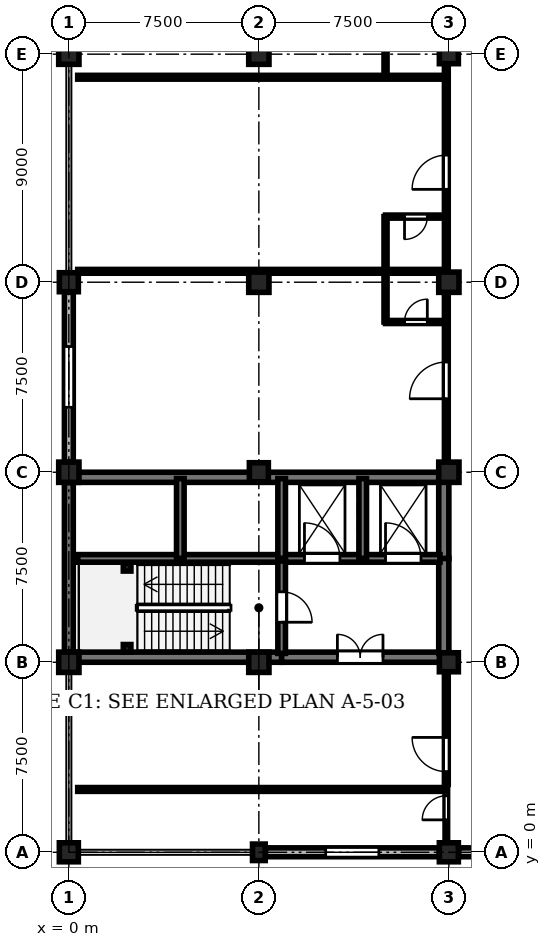
"""IFC4 building model, lengths in metres.
Left out: names, types, materials, properties, quantities, classifications, styles, units other than length and angle.
Written with IfcOpenShell. Run it as: python <this file> out.ifc"""

import sys

from ifc_helpers import new_model, si_unit, direction, frame, frame_2d, origin, origin_with_axes, origin_2d, place, context, subcontext, project, spatial, rectangle, circle, i_section, extrude, element, fill, save


model = new_model("IFC4")
c1 = context("Model", 3, precision=1e-05, world=origin(), true_north=direction((0.0, 1.0)))
c2 = subcontext(c1, "Body", "Model", "MODEL_VIEW")
j1 = project(units=[si_unit("LENGTHUNIT", "METRE"), si_unit("PLANEANGLEUNIT", "RADIAN")], contexts=[c1])
p1 = place(None, origin())
s1 = spatial("IfcSite", under=j1, at=p1, CompositionType="ELEMENT")
p2 = place(p1, origin())
s2 = spatial("IfcBuilding", under=s1, at=p2, CompositionType="ELEMENT")
p3 = place(p2, frame((0.0, 0.0, 9.3)))
s3 = spatial("IfcBuildingStorey", under=s2, at=p3, CompositionType="ELEMENT", Elevation=9.3)
p4 = place(p3, origin_with_axes())
e1 = element("IfcColumn", 1, at=p4, inside=s3, PredefinedType="COLUMN", context=c2, shape_type="SweptSolid", body=[
    extrude(rectangle(XDim=0.75, YDim=0.75, at=origin_2d()), origin(), (0.0, 0.0, 1.0), 4.8),
])
for number, where, z_axis, x_axis in (
    (2, (0.0, 7.5, 0.0), (0.0, 0.0, 1.0), (1.0, 0.0, 0.0)),
    (3, (0.0, 15.0, 0.0), (0.0, 0.0, 1.0), (1.0, 0.0, 0.0)),
):
    element("IfcColumn", number, at=place(p3, frame(where, z_axis=z_axis, x_axis=x_axis)), inside=s3, PredefinedType="COLUMN", context=c2, shape_type="SweptSolid", body=[
        extrude(rectangle(XDim=0.8, YDim=0.8, at=origin_2d()), origin(), (0.0, 0.0, 1.0), 4.8),
    ])
p5 = place(p3, frame((0.0, 22.5, 0.0), z_axis=(0.0, 0.0, 1.0), x_axis=(1.0, 0.0, 0.0)))
e4 = element("IfcColumn", 4, at=p5, inside=s3, PredefinedType="COLUMN", context=c2, shape_type="SweptSolid", body=[
    extrude(circle(Radius=0.375, at=origin_2d()), origin(), (0.0, 0.0, 1.0), 4.8),
])
p6 = place(p3, frame((0.0, 31.5, 0.0), z_axis=(0.0, 0.0, 1.0), x_axis=(1.0, 0.0, 0.0)))
e5 = element("IfcColumn", 5, at=p6, inside=s3, PredefinedType="COLUMN", context=c2, shape_type="SweptSolid", body=[
    extrude(rectangle(XDim=0.8, YDim=0.8, at=origin_2d()), origin(), (0.0, 0.0, 1.0), 4.8),
])
p7 = place(p3, frame((7.5, 0.0, 0.0), z_axis=(0.0, 0.0, 1.0), x_axis=(1.0, 0.0, 0.0)))
e6 = element("IfcColumn", 6, at=p7, inside=s3, PredefinedType="COLUMN", context=c2, shape_type="SweptSolid", body=[
    extrude(rectangle(XDim=0.5, YDim=0.65, at=origin_2d()), origin(), (0.0, 0.0, 1.0), 4.8),
])
p8 = place(p3, frame((7.5, 7.5, 0.0), z_axis=(0.0, 0.0, 1.0), x_axis=(1.0, 0.0, 0.0)))
e7 = element("IfcColumn", 7, at=p8, inside=s3, PredefinedType="COLUMN", context=c2, shape_type="SweptSolid", body=[
    extrude(rectangle(XDim=0.8, YDim=0.8, at=origin_2d()), origin(), (0.0, 0.0, 1.0), 4.8),
])
p9 = place(p3, frame((7.5, 15.0, 0.0), z_axis=(0.0, 0.0, 1.0), x_axis=(1.0, 0.0, 0.0)))
e8 = element("IfcColumn", 8, at=p9, inside=s3, PredefinedType="COLUMN", context=c2, shape_type="SweptSolid", body=[
    extrude(circle(Radius=0.375, at=origin_2d()), origin(), (0.0, 0.0, 1.0), 4.8),
])
for number, where, z_axis, x_axis in (
    (9, (7.5, 22.5, 0.0), (0.0, 0.0, 1.0), (1.0, 0.0, 0.0)),
    (10, (7.5, 31.5, 0.0), (0.0, 0.0, 1.0), (1.0, 0.0, 0.0)),
):
    element("IfcColumn", number, at=place(p3, frame(where, z_axis=z_axis, x_axis=x_axis)), inside=s3, PredefinedType="COLUMN", context=c2, shape_type="SweptSolid", body=[
        extrude(rectangle(XDim=0.8, YDim=0.8, at=origin_2d()), origin(), (0.0, 0.0, 1.0), 4.8),
    ])
p10 = place(p3, frame((15.0, 0.0, 0.0), z_axis=(0.0, 0.0, 1.0), x_axis=(1.0, 0.0, 0.0)))
e11 = element("IfcColumn", 11, at=p10, inside=s3, PredefinedType="COLUMN", context=c2, shape_type="SweptSolid", body=[
    extrude(rectangle(XDim=0.75, YDim=0.75, at=origin_2d()), origin(), (0.0, 0.0, 1.0), 4.8),
])
p11 = place(p3, frame((15.0, 7.5, 0.0), z_axis=(0.0, 0.0, 1.0), x_axis=(1.0, 0.0, 0.0)))
e12 = element("IfcColumn", 12, at=p11, inside=s3, PredefinedType="COLUMN", context=c2, shape_type="SweptSolid", body=[
    extrude(circle(Radius=0.375, at=origin_2d()), origin(), (0.0, 0.0, 1.0), 4.8),
])
for number, where, z_axis, x_axis in (
    (13, (15.0, 15.0, 0.0), (0.0, 0.0, 1.0), (1.0, 0.0, 0.0)),
    (14, (15.0, 22.5, 0.0), (0.0, 0.0, 1.0), (1.0, 0.0, 0.0)),
):
    element("IfcColumn", number, at=place(p3, frame(where, z_axis=z_axis, x_axis=x_axis)), inside=s3, PredefinedType="COLUMN", context=c2, shape_type="SweptSolid", body=[
        extrude(rectangle(XDim=0.8, YDim=0.8, at=origin_2d()), origin(), (0.0, 0.0, 1.0), 4.8),
    ])
p12 = place(p3, frame((15.0, 31.5, 0.0), z_axis=(0.0, 0.0, 1.0), x_axis=(1.0, 0.0, 0.0)))
e15 = element("IfcColumn", 15, at=p12, inside=s3, PredefinedType="COLUMN", context=c2, shape_type="SweptSolid", body=[
    extrude(circle(Radius=0.375, at=origin_2d()), origin(), (0.0, 0.0, 1.0), 4.8),
])
for number, where, z_axis, x_axis in (
    (16, (2.3, 8.05, 0.0), (0.0, 0.0, 1.0), (1.0, 0.0, 0.0)),
    (17, (2.3, 11.25, 0.0), (0.0, 0.0, 1.0), (1.0, 0.0, 0.0)),
):
    element("IfcColumn", number, at=place(p3, frame(where, z_axis=z_axis, x_axis=x_axis)), inside=s3, PredefinedType="COLUMN", context=c2, shape_type="SweptSolid", body=[
        extrude(i_section(OverallWidth=0.3, OverallDepth=0.3, WebThickness=0.011, FlangeThickness=0.019, FilletRadius=0.027, at=origin_2d()), origin(), (0.0, 0.0, 1.0), 4.8),
    ])
p13 = place(p3, frame((0.0, 7.91, 0.0), z_axis=(0.0, 0.0, 1.0), x_axis=(0.0, 1.0, 0.0)))
e18 = element("IfcWall", 18, at=p13, inside=s3, PredefinedType="SHEAR", context=c2, shape_type="SweptSolid", body=[
    extrude(rectangle(XDim=6.68, YDim=0.35, at=frame_2d((3.34, 0.0))), origin(), (0.0, 0.0, 1.0), 4.55),
])
p14 = place(p3, frame((0.0, 15.41, 0.0), z_axis=(0.0, 0.0, 1.0), x_axis=(0.0, 1.0, 0.0)))
e19 = element("IfcWall", 19, at=p14, inside=s3, PredefinedType="STANDARD", context=c2, shape_type="SweptSolid", body=[
    extrude(rectangle(XDim=6.705, YDim=0.35, at=frame_2d((3.353, 0.0))), origin(), (0.0, 0.0, 1.0), 3.95),
])
p15 = place(p14, frame((2.153, 0.0, 0.9)))
e20 = element("IfcOpeningElement", 20, at=p15, cuts=e19, PredefinedType="OPENING", context=c2, shape_type="SweptSolid", body=[
    extrude(rectangle(XDim=2.4, YDim=2.1, at=frame_2d((1.2, 1.05))), frame((0.0, 0.185, 0.0), z_axis=(0.0, -1.0, 0.0), x_axis=(1.0, 0.0, 0.0)), (0.0, 0.0, 1.0), 0.37),
])
p16 = place(p3, frame((14.615, 0.0, 0.0), z_axis=(0.0, 0.0, 1.0), x_axis=(-1.0, 0.0, 0.0)))
e21 = element("IfcWall", 21, at=p16, inside=s3, PredefinedType="STANDARD", context=c2, shape_type="SweptSolid", body=[
    extrude(rectangle(XDim=6.855, YDim=0.35, at=frame_2d((3.427, 0.0))), origin(), (0.0, 0.0, 1.0), 3.95),
])
p17 = place(p16, frame((2.377, 0.0, 0.9)))
e22 = element("IfcOpeningElement", 22, at=p17, cuts=e21, PredefinedType="OPENING", context=c2, shape_type="SweptSolid", body=[
    extrude(rectangle(XDim=2.1, YDim=2.1, at=frame_2d((1.05, 1.05))), frame((0.0, 0.185, 0.0), z_axis=(0.0, -1.0, 0.0), x_axis=(1.0, 0.0, 0.0)), (0.0, 0.0, 1.0), 0.37),
])
p18 = place(p3, frame((22.24, 0.0, 0.0), z_axis=(0.0, 0.0, 1.0), x_axis=(-1.0, 0.0, 0.0)))
e23 = element("IfcWall", 23, at=p18, inside=s3, PredefinedType="STANDARD", context=c2, shape_type="SweptSolid", body=[
    extrude(rectangle(XDim=6.855, YDim=0.35, at=frame_2d((3.427, 0.0))), origin(), (0.0, 0.0, 1.0), 3.95),
])
p19 = place(p18, frame((2.228, 0.0, 0.9)))
e24 = element("IfcOpeningElement", 24, at=p19, cuts=e23, PredefinedType="OPENING", context=c2, shape_type="SweptSolid", body=[
    extrude(rectangle(XDim=2.4, YDim=2.1, at=frame_2d((1.2, 1.05))), frame((0.0, 0.185, 0.0), z_axis=(0.0, -1.0, 0.0), x_axis=(1.0, 0.0, 0.0)), (0.0, 0.0, 1.0), 0.37),
])
p20 = place(p3, frame((0.35, 7.7, 0.0), z_axis=(0.0, 0.0, 1.0), x_axis=(1.0, 0.0, 0.0)))
e25 = element("IfcWall", 25, at=p20, inside=s3, PredefinedType="SHEAR", context=c2, shape_type="SweptSolid", body=[
    extrude(rectangle(XDim=8.05, YDim=0.4, at=frame_2d((4.025, 0.0))), origin(), (0.0, 0.0, 1.0), 4.55),
])
p21 = place(p3, frame((8.4, 7.7, 0.0), z_axis=(0.0, 0.0, 1.0), x_axis=(1.0, 0.0, 0.0)))
e26 = element("IfcWall", 26, at=p21, inside=s3, PredefinedType="SHEAR", context=c2, shape_type="SweptSolid", body=[
    extrude(rectangle(XDim=6.25, YDim=0.4, at=frame_2d((3.125, 0.0))), origin(), (0.0, 0.0, 1.0), 4.55),
])
p22 = place(p21, frame((2.2, 0.0, 0.0)))
e27 = element("IfcOpeningElement", 27, at=p22, cuts=e26, PredefinedType="OPENING", context=c2, shape_type="SweptSolid", body=[
    extrude(rectangle(XDim=1.8, YDim=2.25, at=frame_2d((0.9, 1.125))), frame((0.0, 0.21, 0.0), z_axis=(0.0, -1.0, 0.0), x_axis=(1.0, 0.0, 0.0)), (0.0, 0.0, 1.0), 0.42),
])
p23 = place(p3, frame((0.35, 14.8, 0.0), z_axis=(0.0, 0.0, 1.0), x_axis=(1.0, 0.0, 0.0)))
e28 = element("IfcWall", 28, at=p23, inside=s3, PredefinedType="SHEAR", context=c2, shape_type="SweptSolid", body=[
    extrude(rectangle(XDim=14.3, YDim=0.4, at=frame_2d((7.15, 0.0))), origin(), (0.0, 0.0, 1.0), 4.55),
])
p24 = place(p3, frame((14.8, 7.85, 0.0), z_axis=(0.0, 0.0, 1.0), x_axis=(0.0, 1.0, 0.0)))
e29 = element("IfcWall", 29, at=p24, inside=s3, PredefinedType="SHEAR", context=c2, shape_type="SweptSolid", body=[
    extrude(rectangle(XDim=3.75, YDim=0.4, at=frame_2d((1.875, 0.0))), origin(), (0.0, 0.0, 1.0), 4.55),
])
p25 = place(p3, frame((14.8, 11.6, 0.0), z_axis=(0.0, 0.0, 1.0), x_axis=(0.0, 1.0, 0.0)))
e30 = element("IfcWall", 30, at=p25, inside=s3, PredefinedType="SHEAR", context=c2, shape_type="SweptSolid", body=[
    extrude(rectangle(XDim=3.05, YDim=0.4, at=frame_2d((1.525, 0.0))), origin(), (0.0, 0.0, 1.0), 4.55),
])
p26 = place(p3, frame((0.35, 11.6, 0.0), z_axis=(0.0, 0.0, 1.0), x_axis=(1.0, 0.0, 0.0)))
e31 = element("IfcWall", 31, at=p26, inside=s3, PredefinedType="SHEAR", context=c2, shape_type="SweptSolid", body=[
    extrude(rectangle(XDim=8.05, YDim=0.3, at=frame_2d((4.025, 0.0))), origin(), (0.0, 0.0, 1.0), 4.55),
])
p27 = place(p3, frame((8.4, 11.6, 0.0), z_axis=(0.0, 0.0, 1.0), x_axis=(1.0, 0.0, 0.0)))
e32 = element("IfcWall", 32, at=p27, inside=s3, PredefinedType="SHEAR", context=c2, shape_type="SweptSolid", body=[
    extrude(rectangle(XDim=6.25, YDim=0.3, at=frame_2d((3.125, 0.0))), origin(), (0.0, 0.0, 1.0), 4.55),
])
p28 = place(p27, frame((0.9, 0.0, 0.0)))
e33 = element("IfcOpeningElement", 33, at=p28, cuts=e32, PredefinedType="OPENING", context=c2, shape_type="SweptSolid", body=[
    extrude(rectangle(XDim=1.4, YDim=2.25, at=frame_2d((0.7, 1.125))), frame((0.0, 0.16, 0.0), z_axis=(0.0, -1.0, 0.0), x_axis=(1.0, 0.0, 0.0)), (0.0, 0.0, 1.0), 0.32),
])
p29 = place(p27, frame((4.1, 0.0, 0.0)))
e34 = element("IfcOpeningElement", 34, at=p29, cuts=e32, PredefinedType="OPENING", context=c2, shape_type="SweptSolid", body=[
    extrude(rectangle(XDim=1.4, YDim=2.25, at=frame_2d((0.7, 1.125))), frame((0.0, 0.16, 0.0), z_axis=(0.0, -1.0, 0.0), x_axis=(1.0, 0.0, 0.0)), (0.0, 0.0, 1.0), 0.32),
])
p30 = place(p3, frame((8.4, 11.5, 0.0), z_axis=(0.0, 0.0, 1.0), x_axis=(0.0, -1.0, 0.0)))
e35 = element("IfcWall", 35, at=p30, inside=s3, PredefinedType="SHEAR", context=c2, shape_type="SweptSolid", body=[
    extrude(rectangle(XDim=3.65, YDim=0.3, at=frame_2d((1.825, 0.0))), origin(), (0.0, 0.0, 1.0), 4.55),
])
p31 = place(p30, frame((1.22, 0.0, 0.0)))
e36 = element("IfcOpeningElement", 36, at=p31, cuts=e35, PredefinedType="OPENING", context=c2, shape_type="SweptSolid", body=[
    extrude(rectangle(XDim=1.2, YDim=2.25, at=frame_2d((0.6, 1.125))), frame((0.0, 0.16, 0.0), z_axis=(0.0, -1.0, 0.0), x_axis=(1.0, 0.0, 0.0)), (0.0, 0.0, 1.0), 0.32),
])
for number, where, z_axis, x_axis in (
    (37, (4.4, 11.6, 0.0), (0.0, 0.0, 1.0), (0.0, 1.0, 0.0)),
    (38, (8.4, 11.6, 0.0), (0.0, 0.0, 1.0), (0.0, 1.0, 0.0)),
    (39, (11.6, 11.6, 0.0), (0.0, 0.0, 1.0), (0.0, 1.0, 0.0)),
):
    element("IfcWall", number, at=place(p3, frame(where, z_axis=z_axis, x_axis=x_axis)), inside=s3, PredefinedType="SHEAR", context=c2, shape_type="SweptSolid", body=[
        extrude(rectangle(XDim=3.15, YDim=0.3, at=frame_2d((1.575, 0.0))), origin(), (0.0, 0.0, 1.0), 4.55),
    ])
p32 = place(p3, frame((14.9, 0.43, 0.0), z_axis=(0.0, 0.0, 1.0), x_axis=(0.0, 1.0, 0.0)))
e40 = element("IfcWall", 40, at=p32, inside=s3, PredefinedType="PARTITIONING", context=c2, shape_type="SweptSolid", body=[
    extrude(rectangle(XDim=2.05, YDim=0.1, at=frame_2d((1.025, 0.0))), origin(), (0.0, 0.0, 1.0), 3.985),
])
p33 = place(p32, frame((0.85, 0.0, 0.0)))
e41 = element("IfcOpeningElement", 41, at=p33, cuts=e40, PredefinedType="OPENING", context=c2, shape_type="SweptSolid", body=[
    extrude(rectangle(XDim=0.95, YDim=2.15, at=frame_2d((0.475, 1.075))), frame((0.0, 0.06, 0.0), z_axis=(0.0, -1.0, 0.0), x_axis=(1.0, 0.0, 0.0)), (0.0, 0.0, 1.0), 0.12),
])
p34 = place(p3, frame((14.9, 2.68, 0.0), z_axis=(0.0, 0.0, 1.0), x_axis=(0.0, 1.0, 0.0)))
e42 = element("IfcWall", 42, at=p34, inside=s3, PredefinedType="PARTITIONING", context=c2, shape_type="SweptSolid", body=[
    extrude(rectangle(XDim=4.39, YDim=0.15, at=frame_2d((2.195, 0.0))), origin(), (0.0, 0.0, 1.0), 3.985),
])
p35 = place(p34, frame((0.504, 0.0, 0.0)))
e43 = element("IfcOpeningElement", 43, at=p35, cuts=e42, PredefinedType="OPENING", context=c2, shape_type="SweptSolid", body=[
    extrude(rectangle(XDim=1.35, YDim=2.25, at=frame_2d((0.675, 1.125))), frame((0.0, 0.085, 0.0), z_axis=(0.0, -1.0, 0.0), x_axis=(1.0, 0.0, 0.0)), (0.0, 0.0, 1.0), 0.17),
])
p36 = place(p3, frame((14.9, 15.43, 0.0), z_axis=(0.0, 0.0, 1.0), x_axis=(0.0, 1.0, 0.0)))
e44 = element("IfcWall", 44, at=p36, inside=s3, PredefinedType="PARTITIONING", context=c2, shape_type="SweptSolid", body=[
    extrude(rectangle(XDim=7.5, YDim=0.15, at=frame_2d((3.75, 0.0))), origin(), (0.0, 0.0, 1.0), 3.835),
])
p37 = place(p36, frame((2.47, 0.0, 0.0)))
e45 = element("IfcOpeningElement", 45, at=p37, cuts=e44, PredefinedType="OPENING", context=c2, shape_type="SweptSolid", body=[
    extrude(rectangle(XDim=1.45, YDim=2.3, at=frame_2d((0.725, 1.15))), frame((0.0, 0.085, 0.0), z_axis=(0.0, -1.0, 0.0), x_axis=(1.0, 0.0, 0.0)), (0.0, 0.0, 1.0), 0.17),
])
p38 = place(p3, frame((12.5, 20.93, 0.0), z_axis=(0.0, 0.0, 1.0), x_axis=(1.0, 0.0, 0.0)))
e46 = element("IfcWall", 46, at=p38, inside=s3, PredefinedType="PARTITIONING", context=c2, shape_type="SweptSolid", body=[
    extrude(rectangle(XDim=2.4, YDim=0.12, at=frame_2d((1.2, 0.0))), origin(), (0.0, 0.0, 1.0), 4.535),
])
p39 = place(p38, frame((0.75, 0.0, 0.0)))
e47 = element("IfcOpeningElement", 47, at=p39, cuts=e46, PredefinedType="OPENING", context=c2, shape_type="SweptSolid", body=[
    extrude(rectangle(XDim=0.9, YDim=2.1, at=frame_2d((0.45, 1.05))), frame((0.0, 0.07, 0.0), z_axis=(0.0, -1.0, 0.0), x_axis=(1.0, 0.0, 0.0)), (0.0, 0.0, 1.0), 0.14),
])
p40 = place(p3, frame((12.5, 20.93, 0.0), z_axis=(0.0, 0.0, 1.0), x_axis=(0.0, 1.0, 0.0)))
e48 = element("IfcWall", 48, at=p40, inside=s3, PredefinedType="PARTITIONING", context=c2, shape_type="SweptSolid", body=[
    extrude(rectangle(XDim=2.0, YDim=0.12, at=frame_2d((1.0, 0.0))), origin(), (0.0, 0.0, 1.0), 4.535),
])
p41 = place(p3, frame((14.9, 23.09, 0.0), z_axis=(0.0, 0.0, 1.0), x_axis=(0.0, 1.0, 0.0)))
e49 = element("IfcWall", 49, at=p41, inside=s3, PredefinedType="PARTITIONING", context=c2, shape_type="SweptSolid", body=[
    extrude(rectangle(XDim=7.5, YDim=0.15, at=frame_2d((3.75, 0.0))), origin(), (0.0, 0.0, 1.0), 3.835),
])
p42 = place(p41, frame((3.075, 0.0, 0.0)))
e50 = element("IfcOpeningElement", 50, at=p42, cuts=e49, PredefinedType="OPENING", context=c2, shape_type="SweptSolid", body=[
    extrude(rectangle(XDim=1.35, YDim=2.25, at=frame_2d((0.675, 1.125))), frame((0.0, 0.085, 0.0), z_axis=(0.0, -1.0, 0.0), x_axis=(1.0, 0.0, 0.0)), (0.0, 0.0, 1.0), 0.17),
])
p43 = place(p3, frame((14.9, 25.09, 0.0), z_axis=(0.0, 0.0, 1.0), x_axis=(-1.0, 0.0, 0.0)))
e51 = element("IfcWall", 51, at=p43, inside=s3, PredefinedType="PARTITIONING", context=c2, shape_type="SweptSolid", body=[
    extrude(rectangle(XDim=2.4, YDim=0.12, at=frame_2d((1.2, 0.0))), origin(), (0.0, 0.0, 1.0), 4.535),
])
p44 = place(p43, frame((0.75, 0.0, 0.0)))
e52 = element("IfcOpeningElement", 52, at=p44, cuts=e51, PredefinedType="OPENING", context=c2, shape_type="SweptSolid", body=[
    extrude(rectangle(XDim=0.9, YDim=2.1, at=frame_2d((0.45, 1.05))), frame((0.0, 0.07, 0.0), z_axis=(0.0, -1.0, 0.0), x_axis=(1.0, 0.0, 0.0)), (0.0, 0.0, 1.0), 0.14),
])
p45 = place(p3, frame((12.5, 23.09, 0.0), z_axis=(0.0, 0.0, 1.0), x_axis=(0.0, 1.0, 0.0)))
e53 = element("IfcWall", 53, at=p45, inside=s3, PredefinedType="PARTITIONING", context=c2, shape_type="SweptSolid", body=[
    extrude(rectangle(XDim=2.0, YDim=0.12, at=frame_2d((1.0, 0.0))), origin(), (0.0, 0.0, 1.0), 4.535),
])
p46 = place(p3, frame((14.9, 30.75, 0.0), z_axis=(0.0, 0.0, 1.0), x_axis=(0.0, 1.0, 0.0)))
e54 = element("IfcWall", 54, at=p46, inside=s3, PredefinedType="PARTITIONING", context=c2, shape_type="SweptSolid", body=[
    extrude(rectangle(XDim=7.5, YDim=0.15, at=frame_2d((3.75, 0.0))), origin(), (0.0, 0.0, 1.0), 3.835),
])
p47 = place(p46, frame((3.58, 0.0, 0.0)))
e55 = element("IfcOpeningElement", 55, at=p47, cuts=e54, PredefinedType="OPENING", context=c2, shape_type="SweptSolid", body=[
    extrude(rectangle(XDim=1.45, YDim=2.3, at=frame_2d((0.725, 1.15))), frame((0.0, 0.085, 0.0), z_axis=(0.0, -1.0, 0.0), x_axis=(1.0, 0.0, 0.0)), (0.0, 0.0, 1.0), 0.17),
])
p48 = place(p3, frame((12.5, 30.75, 0.0), z_axis=(0.0, 0.0, 1.0), x_axis=(0.0, 1.0, 0.0)))
e56 = element("IfcWall", 56, at=p48, inside=s3, PredefinedType="PARTITIONING", context=c2, shape_type="SweptSolid", body=[
    extrude(rectangle(XDim=2.0, YDim=0.12, at=frame_2d((1.0, 0.0))), origin(), (0.0, 0.0, 1.0), 4.535),
])
for number, where, z_axis, x_axis in (
    (57, (0.35, 2.48, 0.0), (0.0, 0.0, 1.0), (1.0, 0.0, 0.0)),
    (58, (0.35, 22.93, 0.0), (0.0, 0.0, 1.0), (1.0, 0.0, 0.0)),
    (59, (0.35, 30.59, 0.0), (0.0, 0.0, 1.0), (1.0, 0.0, 0.0)),
):
    element("IfcWall", number, at=place(p3, frame(where, z_axis=z_axis, x_axis=x_axis)), inside=s3, PredefinedType="PARTITIONING", context=c2, shape_type="SweptSolid", body=[
        extrude(rectangle(XDim=14.55, YDim=0.15, at=frame_2d((7.275, 0.0))), origin(), (0.0, 0.0, 1.0), 4.535),
    ])
p49 = place(p15, origin())
e60 = element("IfcWindow", 60, at=p49, inside=s3, PartitioningType="SINGLE_PANEL", PredefinedType="WINDOW", context=c2, shape_type="SweptSolid", body=[
    extrude(rectangle(XDim=2.4, YDim=2.1, at=frame_2d((1.2, 1.05))), frame((0.0, 0.03, 0.0), z_axis=(0.0, -1.0, 0.0), x_axis=(1.0, 0.0, 0.0)), (0.0, 0.0, 1.0), 0.06),
])
fill(e20, e60)
p50 = place(p17, origin())
e61 = element("IfcWindow", 61, at=p50, inside=s3, PartitioningType="SINGLE_PANEL", PredefinedType="WINDOW", context=c2, shape_type="SweptSolid", body=[
    extrude(rectangle(XDim=2.1, YDim=2.1, at=frame_2d((1.05, 1.05))), frame((0.0, 0.03, 0.0), z_axis=(0.0, -1.0, 0.0), x_axis=(1.0, 0.0, 0.0)), (0.0, 0.0, 1.0), 0.06),
])
fill(e22, e61)
p51 = place(p22, origin())
e62 = element("IfcDoor", 62, at=p51, inside=s3, OperationType="DOUBLE_DOOR_SINGLE_SWING", PredefinedType="DOOR", context=c2, shape_type="SweptSolid", body=[
    extrude(rectangle(XDim=1.8, YDim=2.25, at=frame_2d((0.9, 1.125))), frame((0.0, 0.025, 0.0), z_axis=(0.0, -1.0, 0.0), x_axis=(1.0, 0.0, 0.0)), (0.0, 0.0, 1.0), 0.05),
])
fill(e27, e62)
p52 = place(p28, origin())
e63 = element("IfcDoor", 63, at=p52, inside=s3, OperationType="DOUBLE_DOOR_SLIDING", PredefinedType="DOOR", context=c2, shape_type="SweptSolid", body=[
    extrude(rectangle(XDim=1.4, YDim=2.25, at=frame_2d((0.7, 1.125))), frame((0.0, 0.025, 0.0), z_axis=(0.0, -1.0, 0.0), x_axis=(1.0, 0.0, 0.0)), (0.0, 0.0, 1.0), 0.05),
])
fill(e33, e63)
p53 = place(p29, origin())
e64 = element("IfcDoor", 64, at=p53, inside=s3, OperationType="DOUBLE_DOOR_SLIDING", PredefinedType="DOOR", context=c2, shape_type="SweptSolid", body=[
    extrude(rectangle(XDim=1.4, YDim=2.25, at=frame_2d((0.7, 1.125))), frame((0.0, 0.025, 0.0), z_axis=(0.0, -1.0, 0.0), x_axis=(1.0, 0.0, 0.0)), (0.0, 0.0, 1.0), 0.05),
])
fill(e34, e64)
p54 = place(p31, origin())
e65 = element("IfcDoor", 65, at=p54, inside=s3, OperationType="SINGLE_SWING_RIGHT", PredefinedType="DOOR", context=c2, shape_type="SweptSolid", body=[
    extrude(rectangle(XDim=1.2, YDim=2.25, at=frame_2d((0.6, 1.125))), frame((0.0, 0.025, 0.0), z_axis=(0.0, -1.0, 0.0), x_axis=(1.0, 0.0, 0.0)), (0.0, 0.0, 1.0), 0.05),
])
fill(e36, e65)
p55 = place(p33, origin())
e66 = element("IfcDoor", 66, at=p55, inside=s3, OperationType="SINGLE_SWING_LEFT", PredefinedType="DOOR", context=c2, shape_type="SweptSolid", body=[
    extrude(rectangle(XDim=0.95, YDim=2.15, at=frame_2d((0.475, 1.075))), frame((0.0, 0.025, 0.0), z_axis=(0.0, -1.0, 0.0), x_axis=(1.0, 0.0, 0.0)), (0.0, 0.0, 1.0), 0.05),
])
fill(e41, e66)
p56 = place(p35, origin())
e67 = element("IfcDoor", 67, at=p56, inside=s3, OperationType="SINGLE_SWING_RIGHT", PredefinedType="DOOR", context=c2, shape_type="SweptSolid", body=[
    extrude(rectangle(XDim=1.35, YDim=2.25, at=frame_2d((0.675, 1.125))), frame((0.0, 0.025, 0.0), z_axis=(0.0, -1.0, 0.0), x_axis=(1.0, 0.0, 0.0)), (0.0, 0.0, 1.0), 0.05),
])
fill(e43, e67)
p57 = place(p37, origin())
e68 = element("IfcDoor", 68, at=p57, inside=s3, OperationType="SINGLE_SWING_LEFT", PredefinedType="DOOR", context=c2, shape_type="SweptSolid", body=[
    extrude(rectangle(XDim=1.45, YDim=2.3, at=frame_2d((0.725, 1.15))), frame((0.0, 0.025, 0.0), z_axis=(0.0, -1.0, 0.0), x_axis=(1.0, 0.0, 0.0)), (0.0, 0.0, 1.0), 0.05),
])
fill(e45, e68)
p58 = place(p39, origin())
e69 = element("IfcDoor", 69, at=p58, inside=s3, OperationType="SINGLE_SWING_RIGHT", PredefinedType="DOOR", context=c2, shape_type="SweptSolid", body=[
    extrude(rectangle(XDim=0.9, YDim=2.1, at=frame_2d((0.45, 1.05))), frame((0.0, 0.025, 0.0), z_axis=(0.0, -1.0, 0.0), x_axis=(1.0, 0.0, 0.0)), (0.0, 0.0, 1.0), 0.05),
])
fill(e47, e69)
p59 = place(p42, origin())
e70 = element("IfcDoor", 70, at=p59, inside=s3, OperationType="SINGLE_SWING_LEFT", PredefinedType="DOOR", context=c2, shape_type="SweptSolid", body=[
    extrude(rectangle(XDim=1.35, YDim=2.25, at=frame_2d((0.675, 1.125))), frame((0.0, 0.025, 0.0), z_axis=(0.0, -1.0, 0.0), x_axis=(1.0, 0.0, 0.0)), (0.0, 0.0, 1.0), 0.05),
])
fill(e50, e70)
p60 = place(p44, origin())
e71 = element("IfcDoor", 71, at=p60, inside=s3, OperationType="SINGLE_SWING_RIGHT", PredefinedType="DOOR", context=c2, shape_type="SweptSolid", body=[
    extrude(rectangle(XDim=0.9, YDim=2.1, at=frame_2d((0.45, 1.05))), frame((0.0, 0.025, 0.0), z_axis=(0.0, -1.0, 0.0), x_axis=(1.0, 0.0, 0.0)), (0.0, 0.0, 1.0), 0.05),
])
fill(e52, e71)
save(model, sys.argv[1])
